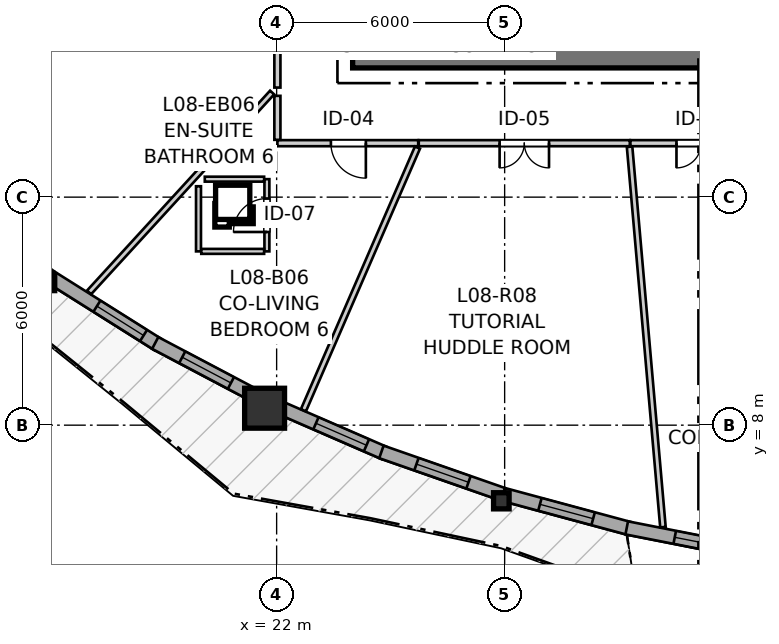
"""IFC4 building model, lengths in metres.
Left out: names, types, materials, properties, quantities, classifications, styles, units other than length and angle.
Written with IfcOpenShell. Run it as: python <this file> out.ifc"""

import sys

from ifc_helpers import new_model, si_unit, direction, frame, frame_2d, origin, origin_2d, place, context, subcontext, project, spatial, rectangle, i_section, extrude, source, transform, mapped, element, fill, save


model = new_model("IFC4")
c1 = context("Model", 3, precision=1e-05, world=origin(), true_north=direction((0.0, 1.0)))
c2 = subcontext(c1, "Body", "Model", "MODEL_VIEW")
j1 = project(units=[si_unit("LENGTHUNIT", "METRE"), si_unit("PLANEANGLEUNIT", "RADIAN")], contexts=[c1])
p1 = place(None, origin())
s1 = spatial("IfcSite", under=j1, at=p1, CompositionType="ELEMENT")
p2 = place(p1, origin())
s2 = spatial("IfcBuilding", under=s1, at=p2, CompositionType="ELEMENT")
p3 = place(p2, frame((0.0, 0.0, 30.2)))
s3 = spatial("IfcBuildingStorey", under=s2, at=p3, CompositionType="ELEMENT", Elevation=30.2)
p4 = place(p3, frame((24.0, 17.8, 0.0), z_axis=(0.0, 0.0, 1.0), x_axis=(1.0, 0.0, 0.0)))
e1 = element("IfcWall", 1, at=p4, inside=s3, PredefinedType="SHEAR", context=c2, shape_type="SweptSolid", body=[
    extrude(rectangle(XDim=12.7, YDim=0.8, at=frame_2d((6.35, 0.0))), origin(), (0.0, 0.0, 1.0), 2.935),
])
m1 = source(origin(), c2, "Body", "SweptSolid", [
    extrude(i_section(OverallWidth=0.409, OverallDepth=0.425, WebThickness=0.03, FlangeThickness=0.048, FilletRadius=0.015, at=origin_2d()), origin(), (0.0, 0.0, 1.0), 2.935),
])
p5 = place(p3, frame((15.956, 11.753, 0.0), z_axis=(0.0, 0.0, 1.0), x_axis=(1.0, 0.0, 0.0)))
e2 = element("IfcColumn", 2, at=p5, inside=s3, PredefinedType="PILASTER", context=c2, shape_type="MappedRepresentation", body=[
    mapped(m1, transform((0.0, 0.0, 0.0), x_axis=(1.0, 0.0, 0.0), y_axis=(0.0, 1.0, 0.0), z_axis=(0.0, 0.0, 1.0), scale=1.0)),
])
m2 = source(origin(), c2, "Body", "SweptSolid", [
    extrude(rectangle(XDim=1.05, YDim=1.05, at=origin_2d()), origin(), (0.0, 0.0, 1.0), 2.935),
])
p6 = place(p3, frame((21.683, 8.446, 0.0), z_axis=(0.0, 0.0, 1.0), x_axis=(1.0, 0.0, 0.0)))
e3 = element("IfcColumn", 3, at=p6, inside=s3, PredefinedType="COLUMN", context=c2, shape_type="MappedRepresentation", body=[
    mapped(m2, transform((0.0, 0.0, 0.0), x_axis=(1.0, 0.0, 0.0), y_axis=(0.0, 1.0, 0.0), z_axis=(0.0, 0.0, 1.0), scale=1.0)),
])
p7 = place(p3, frame((27.913, 6.01, 0.0), z_axis=(0.0, 0.0, 1.0), x_axis=(1.0, 0.0, 0.0)))
e4 = element("IfcColumn", 4, at=p7, inside=s3, PredefinedType="PILASTER", context=c2, shape_type="MappedRepresentation", body=[
    mapped(m1, transform((0.0, 0.0, 0.0), x_axis=(1.0, 0.0, 0.0), y_axis=(0.0, 1.0, 0.0), z_axis=(0.0, 0.0, 1.0), scale=1.0)),
])
p8 = place(p3, frame((13.355, 13.896, 0.0), z_axis=(0.0, 0.0, 1.0), x_axis=(0.803836316566, -0.594850549441, 0.0)))
e5 = element("IfcWall", 5, at=p8, inside=s3, PredefinedType="SOLIDWALL", context=c2, shape_type="SweptSolid", body=[
    extrude(rectangle(XDim=3.346, YDim=0.35, at=frame_2d((1.673, 0.0))), origin(), (0.0, 0.0, 1.0), 2.415),
])
p9 = place(p8, frame((1.108, 0.0, 0.82)))
e6 = element("IfcOpeningElement", 6, at=p9, cuts=e5, PredefinedType="OPENING", context=c2, shape_type="SweptSolid", body=[
    extrude(rectangle(XDim=1.15, YDim=1.2, at=frame_2d((0.575, 0.6))), frame((0.0, 0.185, 0.0), z_axis=(0.0, -1.0, 0.0), x_axis=(1.0, 0.0, 0.0)), (0.0, 0.0, 1.0), 0.37),
])
p10 = place(p3, frame((16.066, 11.89, 0.0), z_axis=(0.0, 0.0, 1.0), x_axis=(0.846403135518, -0.532542704565, 0.0)))
e7 = element("IfcWall", 7, at=p10, inside=s3, PredefinedType="SOLIDWALL", context=c2, shape_type="SweptSolid", body=[
    extrude(rectangle(XDim=3.327, YDim=0.35, at=frame_2d((1.664, 0.0))), origin(), (0.0, 0.0, 1.0), 2.415),
])
p11 = place(p10, frame((1.424, 0.0, 0.82)))
e8 = element("IfcOpeningElement", 8, at=p11, cuts=e7, PredefinedType="OPENING", context=c2, shape_type="SweptSolid", body=[
    extrude(rectangle(XDim=1.45, YDim=1.25, at=frame_2d((0.725, 0.625))), frame((0.0, 0.185, 0.0), z_axis=(0.0, -1.0, 0.0), x_axis=(1.0, 0.0, 0.0)), (0.0, 0.0, 1.0), 0.37),
])
p12 = place(p3, frame((18.805, 10.163, 0.0), z_axis=(0.0, 0.0, 1.0), x_axis=(0.884387509242, -0.466753396877, 0.0)))
e9 = element("IfcWall", 9, at=p12, inside=s3, PredefinedType="SOLIDWALL", context=c2, shape_type="SweptSolid", body=[
    extrude(rectangle(XDim=3.047, YDim=0.35, at=frame_2d((1.523, 0.0))), origin(), (0.0, 0.0, 1.0), 2.415),
])
p13 = place(p12, frame((0.803, 0.0, 0.82)))
e10 = element("IfcOpeningElement", 10, at=p13, cuts=e9, PredefinedType="OPENING", context=c2, shape_type="SweptSolid", body=[
    extrude(rectangle(XDim=1.45, YDim=1.25, at=frame_2d((0.725, 0.625))), frame((0.0, 0.185, 0.0), z_axis=(0.0, -1.0, 0.0), x_axis=(1.0, 0.0, 0.0)), (0.0, 0.0, 1.0), 0.37),
])
p14 = place(p3, frame((22.028, 8.487, 0.0), z_axis=(0.0, 0.0, 1.0), x_axis=(0.917081449464, -0.398699906006, 0.0)))
e11 = element("IfcWall", 11, at=p14, inside=s3, PredefinedType="SOLIDWALL", context=c2, shape_type="SweptSolid", body=[
    extrude(rectangle(XDim=3.066, YDim=0.35, at=frame_2d((1.533, 0.0))), origin(), (0.0, 0.0, 1.0), 2.415),
])
p15 = place(p14, frame((1.097, 0.0, 0.82)))
e12 = element("IfcOpeningElement", 12, at=p15, cuts=e11, PredefinedType="OPENING", context=c2, shape_type="SweptSolid", body=[
    extrude(rectangle(XDim=1.45, YDim=1.25, at=frame_2d((0.725, 0.625))), frame((0.0, 0.185, 0.0), z_axis=(0.0, -1.0, 0.0), x_axis=(1.0, 0.0, 0.0)), (0.0, 0.0, 1.0), 0.37),
])
p16 = place(p3, frame((24.757, 7.297, 0.0), z_axis=(0.0, 0.0, 1.0), x_axis=(0.944122401027, -0.329595042254, 0.0)))
e13 = element("IfcWall", 13, at=p16, inside=s3, PredefinedType="SOLIDWALL", context=c2, shape_type="SweptSolid", body=[
    extrude(rectangle(XDim=3.384, YDim=0.35, at=frame_2d((1.692, 0.0))), origin(), (0.0, 0.0, 1.0), 2.415),
])
p17 = place(p16, frame((0.977, 0.0, 0.82)))
e14 = element("IfcOpeningElement", 14, at=p17, cuts=e13, PredefinedType="OPENING", context=c2, shape_type="SweptSolid", body=[
    extrude(rectangle(XDim=1.45, YDim=1.25, at=frame_2d((0.725, 0.625))), frame((0.0, 0.185, 0.0), z_axis=(0.0, -1.0, 0.0), x_axis=(1.0, 0.0, 0.0)), (0.0, 0.0, 1.0), 0.37),
])
p18 = place(p3, frame((27.978, 6.174, 0.0), z_axis=(0.0, 0.0, 1.0), x_axis=(0.965451765427, -0.260581827136, 0.0)))
e15 = element("IfcWall", 15, at=p18, inside=s3, PredefinedType="SOLIDWALL", context=c2, shape_type="SweptSolid", body=[
    extrude(rectangle(XDim=3.439, YDim=0.35, at=frame_2d((1.72, 0.0))), origin(), (0.0, 0.0, 1.0), 2.415),
])
p19 = place(p18, frame((0.985, 0.0, 0.82)))
e16 = element("IfcOpeningElement", 16, at=p19, cuts=e15, PredefinedType="OPENING", context=c2, shape_type="SweptSolid", body=[
    extrude(rectangle(XDim=1.45, YDim=1.25, at=frame_2d((0.725, 0.625))), frame((0.0, 0.185, 0.0), z_axis=(0.0, -1.0, 0.0), x_axis=(1.0, 0.0, 0.0)), (0.0, 0.0, 1.0), 0.37),
])
p20 = place(p3, frame((31.213, 5.298, 0.0), z_axis=(0.0, 0.0, 1.0), x_axis=(0.9812345335, -0.192818023709, 0.0)))
e17 = element("IfcWall", 17, at=p20, inside=s3, PredefinedType="SOLIDWALL", context=c2, shape_type="SweptSolid", body=[
    extrude(rectangle(XDim=3.232, YDim=0.35, at=frame_2d((1.616, 0.0))), origin(), (0.0, 0.0, 1.0), 2.415),
])
p21 = place(p20, frame((1.287, 0.0, 0.82)))
e18 = element("IfcOpeningElement", 18, at=p21, cuts=e17, PredefinedType="OPENING", context=c2, shape_type="SweptSolid", body=[
    extrude(rectangle(XDim=1.45, YDim=1.25, at=frame_2d((0.725, 0.625))), frame((0.0, 0.185, 0.0), z_axis=(0.0, -1.0, 0.0), x_axis=(1.0, 0.0, 0.0)), (0.0, 0.0, 1.0), 0.37),
])
p22 = place(p3, frame((22.02, 16.883, 0.0), z_axis=(0.0, 0.0, 1.0), x_axis=(0.0, 1.0, 0.0)))
e19 = element("IfcWall", 19, at=p22, inside=s3, PredefinedType="PARTITIONING", context=c2, shape_type="SweptSolid", body=[
    extrude(rectangle(XDim=7.267, YDim=0.16, at=frame_2d((3.633, 0.0))), origin(), (0.0, 0.0, 1.0), 2.935),
])
p23 = place(p22, frame((2.845, 0.0, 0.0)))
e20 = element("IfcOpeningElement", 20, at=p23, cuts=e19, PredefinedType="OPENING", context=c2, shape_type="SweptSolid", body=[
    extrude(rectangle(XDim=1.3, YDim=2.1, at=frame_2d((0.65, 1.05))), frame((0.0, 0.09, 0.0), z_axis=(0.0, -1.0, 0.0), x_axis=(1.0, 0.0, 0.0)), (0.0, 0.0, 1.0), 0.18),
])
p24 = place(p3, frame((31.294, 15.42, 0.0), z_axis=(0.0, 0.0, 1.0), x_axis=(-1.0, 0.0, 0.0)))
e21 = element("IfcWall", 21, at=p24, inside=s3, PredefinedType="PARTITIONING", context=c2, shape_type="SweptSolid", body=[
    extrude(rectangle(XDim=5.554, YDim=0.16, at=frame_2d((2.777, 0.0))), origin(), (0.0, 0.0, 1.0), 2.935),
])
p25 = place(p24, frame((2.126, 0.0, 0.0)))
e22 = element("IfcOpeningElement", 22, at=p25, cuts=e21, PredefinedType="OPENING", context=c2, shape_type="SweptSolid", body=[
    extrude(rectangle(XDim=1.3, YDim=2.1, at=frame_2d((0.65, 1.05))), frame((0.0, 0.09, 0.0), z_axis=(0.0, -1.0, 0.0), x_axis=(1.0, 0.0, 0.0)), (0.0, 0.0, 1.0), 0.18),
])
p26 = place(p3, frame((35.08, 15.42, 0.0), z_axis=(0.0, 0.0, 1.0), x_axis=(-1.0, 0.0, 0.0)))
e23 = element("IfcWall", 23, at=p26, inside=s3, PredefinedType="PARTITIONING", context=c2, shape_type="SweptSolid", body=[
    extrude(rectangle(XDim=3.771, YDim=0.16, at=frame_2d((1.885, 0.0))), origin(), (0.0, 0.0, 1.0), 2.935),
])
p27 = place(p26, frame((1.259, 0.0, 0.0)))
e24 = element("IfcOpeningElement", 24, at=p27, cuts=e23, PredefinedType="OPENING", context=c2, shape_type="SweptSolid", body=[
    extrude(rectangle(XDim=1.3, YDim=2.1, at=frame_2d((0.65, 1.05))), frame((0.0, 0.09, 0.0), z_axis=(0.0, -1.0, 0.0), x_axis=(1.0, 0.0, 0.0)), (0.0, 0.0, 1.0), 0.18),
])
p28 = place(p3, frame((25.725, 15.42, 0.0), z_axis=(0.0, 0.0, 1.0), x_axis=(-1.0, 0.0, 0.0)))
e25 = element("IfcWall", 25, at=p28, inside=s3, PredefinedType="PARTITIONING", context=c2, shape_type="SweptSolid", body=[
    extrude(rectangle(XDim=3.705, YDim=0.16, at=frame_2d((1.853, 0.0))), origin(), (0.0, 0.0, 1.0), 2.935),
])
p29 = place(p28, frame((1.377, 0.0, 0.0)))
e26 = element("IfcOpeningElement", 26, at=p29, cuts=e25, PredefinedType="OPENING", context=c2, shape_type="SweptSolid", body=[
    extrude(rectangle(XDim=0.92, YDim=2.1, at=frame_2d((0.46, 1.05))), frame((0.0, 0.09, 0.0), z_axis=(0.0, -1.0, 0.0), x_axis=(1.0, 0.0, 0.0)), (0.0, 0.0, 1.0), 0.18),
])
p30 = place(p3, frame((21.744, 12.573, 0.0), z_axis=(0.0, 0.0, 1.0), x_axis=(0.0, 1.0, 0.0)))
e27 = element("IfcWall", 27, at=p30, inside=s3, PredefinedType="PARTITIONING", context=c2, shape_type="SweptSolid", body=[
    extrude(rectangle(XDim=1.9, YDim=0.13, at=frame_2d((0.95, 0.0))), origin(), (0.0, 0.0, 1.0), 2.935),
])
p31 = place(p30, frame((0.51, 0.0, 0.0)))
e28 = element("IfcOpeningElement", 28, at=p31, cuts=e27, PredefinedType="OPENING", context=c2, shape_type="SweptSolid", body=[
    extrude(rectangle(XDim=0.88, YDim=2.05, at=frame_2d((0.44, 1.025))), frame((0.0, 0.075, 0.0), z_axis=(0.0, -1.0, 0.0), x_axis=(1.0, 0.0, 0.0)), (0.0, 0.0, 1.0), 0.15),
])
p32 = place(p3, frame((31.287, 15.326, 0.0), z_axis=(0.0, 0.0, 1.0), x_axis=(0.087404477037, -0.99617290537, 0.0)))
e29 = element("IfcWall", 29, at=p32, inside=s3, PredefinedType="PARTITIONING", context=c2, shape_type="SweptSolid", body=[
    extrude(rectangle(XDim=10.047, YDim=0.145, at=frame_2d((5.023, 0.0))), origin(), (0.0, 0.0, 1.0), 2.935),
])
p33 = place(p3, frame((22.705, 8.392, 0.0), z_axis=(0.0, 0.0, 1.0), x_axis=(0.398228422372, 0.917286282256, 0.0)))
e30 = element("IfcWall", 30, at=p33, inside=s3, PredefinedType="PARTITIONING", context=c2, shape_type="SweptSolid", body=[
    extrude(rectangle(XDim=7.535, YDim=0.145, at=frame_2d((3.767, 0.0))), origin(), (0.0, 0.0, 1.0), 2.935),
])
p34 = place(p3, frame((17.064, 11.493, 0.0), z_axis=(0.0, 0.0, 1.0), x_axis=(0.67534166785, 0.737505004502, 0.0)))
e31 = element("IfcWall", 31, at=p34, inside=s3, PredefinedType="PARTITIONING", context=c2, shape_type="SweptSolid", body=[
    extrude(rectangle(XDim=7.132, YDim=0.145, at=frame_2d((3.566, 0.0))), origin(), (0.0, 0.0, 1.0), 2.935),
])
p35 = place(p3, frame((19.944, 12.573, 0.0), z_axis=(0.0, 0.0, 1.0), x_axis=(0.0, 1.0, 0.0)))
e32 = element("IfcWall", 32, at=p35, inside=s3, PredefinedType="PARTITIONING", context=c2, shape_type="SweptSolid", body=[
    extrude(rectangle(XDim=1.714, YDim=0.13, at=frame_2d((0.857, 0.0))), origin(), (0.0, 0.0, 1.0), 2.935),
])
p36 = place(p3, frame((20.11, 14.473, 0.0), z_axis=(0.0, 0.0, 1.0), x_axis=(1.0, 0.0, 0.0)))
e33 = element("IfcWall", 33, at=p36, inside=s3, PredefinedType="PARTITIONING", context=c2, shape_type="SweptSolid", body=[
    extrude(rectangle(XDim=1.561, YDim=0.13, at=frame_2d((0.781, 0.0))), origin(), (0.0, 0.0, 1.0), 2.935),
])
p37 = place(p3, frame((20.017, 12.573, 0.0), z_axis=(0.0, 0.0, 1.0), x_axis=(1.0, 0.0, 0.0)))
e34 = element("IfcWall", 34, at=p37, inside=s3, PredefinedType="PARTITIONING", context=c2, shape_type="SweptSolid", body=[
    extrude(rectangle(XDim=1.654, YDim=0.13, at=frame_2d((0.827, 0.0))), origin(), (0.0, 0.0, 1.0), 2.935),
])
p38 = place(p3, frame((22.02, 15.508, 0.0), z_axis=(0.0, 0.0, 1.0), x_axis=(0.0, 1.0, 0.0)))
e35 = element("IfcWall", 35, at=p38, inside=s3, PredefinedType="PARTITIONING", context=c2, shape_type="SweptSolid", body=[
    extrude(rectangle(XDim=1.157, YDim=0.16, at=frame_2d((0.579, 0.0))), origin(), (0.0, 0.0, 1.0), 2.935),
])
m3 = source(origin(), c2, "Body", "SweptSolid", [
    extrude(rectangle(XDim=1.45, YDim=1.25, at=frame_2d((0.725, 0.625))), frame((0.0, 0.03, 0.0), z_axis=(0.0, -1.0, 0.0), x_axis=(1.0, 0.0, 0.0)), (0.0, 0.0, 1.0), 0.06),
])
p39 = place(p11, origin())
e36 = element("IfcWindow", 36, at=p39, inside=s3, PartitioningType="SINGLE_PANEL", PredefinedType="WINDOW", context=c2, shape_type="MappedRepresentation", body=[
    mapped(m3, transform((0.0, 0.0, 0.0), x_axis=(1.0, 0.0, 0.0), y_axis=(0.0, 1.0, 0.0), z_axis=(0.0, 0.0, 1.0), scale=1.0)),
])
fill(e8, e36)
p40 = place(p13, origin())
e37 = element("IfcWindow", 37, at=p40, inside=s3, PartitioningType="SINGLE_PANEL", PredefinedType="WINDOW", context=c2, shape_type="MappedRepresentation", body=[
    mapped(m3, transform((0.0, 0.0, 0.0), x_axis=(1.0, 0.0, 0.0), y_axis=(0.0, 1.0, 0.0), z_axis=(0.0, 0.0, 1.0), scale=1.0)),
])
fill(e10, e37)
p41 = place(p15, origin())
e38 = element("IfcWindow", 38, at=p41, inside=s3, PartitioningType="SINGLE_PANEL", PredefinedType="WINDOW", context=c2, shape_type="MappedRepresentation", body=[
    mapped(m3, transform((0.0, 0.0, 0.0), x_axis=(1.0, 0.0, 0.0), y_axis=(0.0, 1.0, 0.0), z_axis=(0.0, 0.0, 1.0), scale=1.0)),
])
fill(e12, e38)
p42 = place(p17, origin())
e39 = element("IfcWindow", 39, at=p42, inside=s3, PartitioningType="SINGLE_PANEL", PredefinedType="WINDOW", context=c2, shape_type="MappedRepresentation", body=[
    mapped(m3, transform((0.0, 0.0, 0.0), x_axis=(1.0, 0.0, 0.0), y_axis=(0.0, 1.0, 0.0), z_axis=(0.0, 0.0, 1.0), scale=1.0)),
])
fill(e14, e39)
p43 = place(p19, origin())
e40 = element("IfcWindow", 40, at=p43, inside=s3, PartitioningType="SINGLE_PANEL", PredefinedType="WINDOW", context=c2, shape_type="MappedRepresentation", body=[
    mapped(m3, transform((0.0, 0.0, 0.0), x_axis=(1.0, 0.0, 0.0), y_axis=(0.0, 1.0, 0.0), z_axis=(0.0, 0.0, 1.0), scale=1.0)),
])
fill(e16, e40)
p44 = place(p21, origin())
e41 = element("IfcWindow", 41, at=p44, inside=s3, PartitioningType="SINGLE_PANEL", PredefinedType="WINDOW", context=c2, shape_type="MappedRepresentation", body=[
    mapped(m3, transform((0.0, 0.0, 0.0), x_axis=(1.0, 0.0, 0.0), y_axis=(0.0, 1.0, 0.0), z_axis=(0.0, 0.0, 1.0), scale=1.0)),
])
fill(e18, e41)
m4 = source(origin(), c2, "Body", "SweptSolid", [
    extrude(rectangle(XDim=1.3, YDim=2.1, at=frame_2d((0.65, 1.05))), frame((0.0, 0.025, 0.0), z_axis=(0.0, -1.0, 0.0), x_axis=(1.0, 0.0, 0.0)), (0.0, 0.0, 1.0), 0.05),
])
p45 = place(p25, origin())
e42 = element("IfcDoor", 42, at=p45, inside=s3, OperationType="DOUBLE_DOOR_SINGLE_SWING", PredefinedType="DOOR", context=c2, shape_type="MappedRepresentation", body=[
    mapped(m4, transform((0.0, 0.0, 0.0), x_axis=(1.0, 0.0, 0.0), y_axis=(0.0, 1.0, 0.0), z_axis=(0.0, 0.0, 1.0), scale=1.0)),
])
fill(e22, e42)
p46 = place(p27, origin())
e43 = element("IfcDoor", 43, at=p46, inside=s3, OperationType="DOUBLE_DOOR_SINGLE_SWING", PredefinedType="DOOR", context=c2, shape_type="MappedRepresentation", body=[
    mapped(m4, transform((0.0, 0.0, 0.0), x_axis=(1.0, 0.0, 0.0), y_axis=(0.0, 1.0, 0.0), z_axis=(0.0, 0.0, 1.0), scale=1.0)),
])
fill(e24, e43)
m5 = source(origin(), c2, "Body", "SweptSolid", [
    extrude(rectangle(XDim=0.92, YDim=2.1, at=frame_2d((0.46, 1.05))), frame((0.0, 0.025, 0.0), z_axis=(0.0, -1.0, 0.0), x_axis=(1.0, 0.0, 0.0)), (0.0, 0.0, 1.0), 0.05),
])
p47 = place(p29, origin())
e44 = element("IfcDoor", 44, at=p47, inside=s3, OperationType="SINGLE_SWING_LEFT", PredefinedType="DOOR", context=c2, shape_type="MappedRepresentation", body=[
    mapped(m5, transform((0.0, 0.0, 0.0), x_axis=(1.0, 0.0, 0.0), y_axis=(0.0, 1.0, 0.0), z_axis=(0.0, 0.0, 1.0), scale=1.0)),
])
fill(e26, e44)
m6 = source(origin(), c2, "Body", "SweptSolid", [
    extrude(rectangle(XDim=0.88, YDim=2.05, at=frame_2d((0.44, 1.025))), frame((0.0, 0.025, 0.0), z_axis=(0.0, -1.0, 0.0), x_axis=(1.0, 0.0, 0.0)), (0.0, 0.0, 1.0), 0.05),
])
p48 = place(p31, origin())
e45 = element("IfcDoor", 45, at=p48, inside=s3, OperationType="SINGLE_SWING_LEFT", PredefinedType="DOOR", context=c2, shape_type="MappedRepresentation", body=[
    mapped(m6, transform((0.0, 0.0, 0.0), x_axis=(1.0, 0.0, 0.0), y_axis=(0.0, 1.0, 0.0), z_axis=(0.0, 0.0, 1.0), scale=1.0)),
])
fill(e28, e45)
save(model, sys.argv[1])
